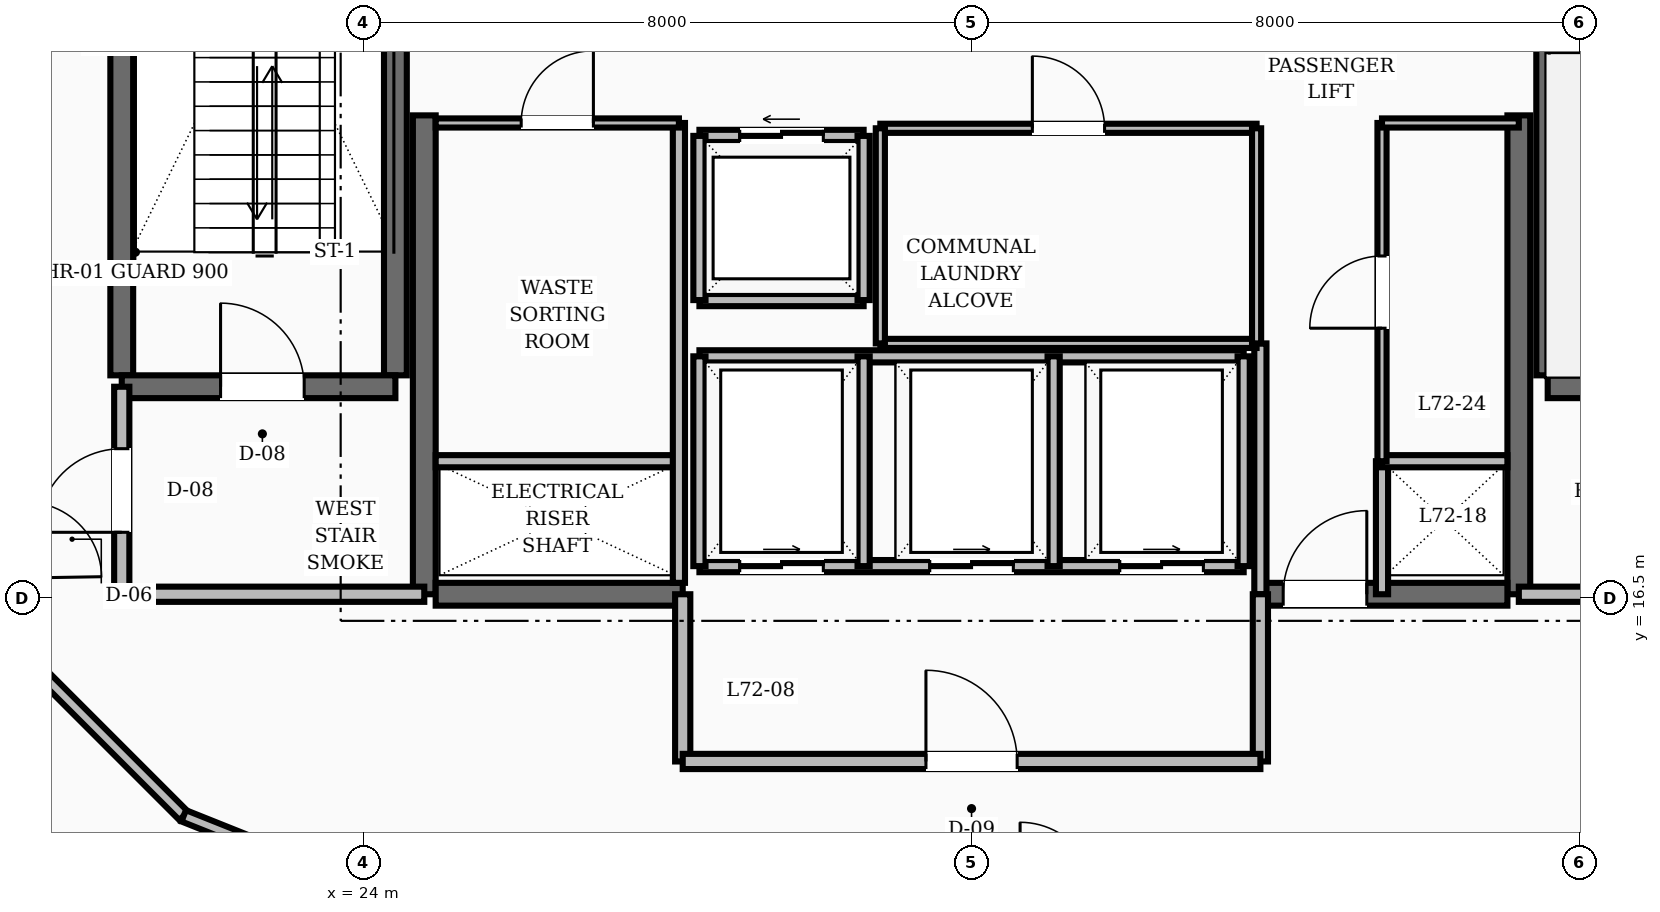
"""IFC4 building model, lengths in metres.
Left out: names, types, materials, properties, quantities, classifications, styles, units other than length and angle.
Written with IfcOpenShell. Run it as: python <this file> out.ifc"""

import sys

from ifc_helpers import new_model, si_unit, direction, frame, frame_2d, origin, place, context, subcontext, project, spatial, rectangle, extrude, element, fill, save


model = new_model("IFC4")
c1 = context("Model", 3, precision=1e-05, world=origin(), true_north=direction((0.0, 1.0)))
c2 = subcontext(c1, "Body", "Model", "MODEL_VIEW")
j1 = project(units=[si_unit("LENGTHUNIT", "METRE"), si_unit("PLANEANGLEUNIT", "RADIAN")], contexts=[c1])
p1 = place(None, origin())
s1 = spatial("IfcSite", under=j1, at=p1, CompositionType="ELEMENT")
p2 = place(p1, origin())
s2 = spatial("IfcBuilding", under=s1, at=p2, CompositionType="ELEMENT")
p3 = place(p2, frame((0.0, 0.0, 276.0)))
s3 = spatial("IfcBuildingStorey", under=s2, at=p3, CompositionType="ELEMENT", Elevation=276.0)
for number, where, z_axis, x_axis in (
    (1, (24.8, 16.55, 0.0), (0.0, 0.0, 1.0), (0.0, 1.0, 0.0)),
    (2, (39.2, 16.55, 0.0), (0.0, 0.0, 1.0), (0.0, 1.0, 0.0)),
):
    element("IfcWall", number, at=place(p3, frame(where, z_axis=z_axis, x_axis=x_axis)), inside=s3, PredefinedType="SHEAR", context=c2, shape_type="SweptSolid", body=[
        extrude(rectangle(XDim=6.3, YDim=0.3, at=frame_2d((3.15, 0.0))), origin(), (0.0, 0.0, 1.0), 3.6),
    ])
p4 = place(p3, frame((24.95, 16.55, 0.0), z_axis=(0.0, 0.0, 1.0), x_axis=(1.0, 0.0, 0.0)))
e3 = element("IfcWall", 3, at=p4, inside=s3, PredefinedType="SHEAR", context=c2, shape_type="SweptSolid", body=[
    extrude(rectangle(XDim=3.25, YDim=0.3, at=frame_2d((1.625, 0.0))), origin(), (0.0, 0.0, 1.0), 3.6),
])
p5 = place(p3, frame((35.8, 16.55, 0.0), z_axis=(0.0, 0.0, 1.0), x_axis=(1.0, 0.0, 0.0)))
e4 = element("IfcWall", 4, at=p5, inside=s3, PredefinedType="SHEAR", context=c2, shape_type="SweptSolid", body=[
    extrude(rectangle(XDim=3.25, YDim=0.3, at=frame_2d((1.625, 0.0))), origin(), (0.0, 0.0, 1.0), 3.6),
])
p6 = place(p5, frame((0.3, 0.0, 0.0)))
e5 = element("IfcOpeningElement", 5, at=p6, cuts=e4, PredefinedType="OPENING", context=c2, shape_type="SweptSolid", body=[
    extrude(rectangle(XDim=1.1, YDim=2.1, at=frame_2d((0.55, 1.05))), frame((0.0, 0.16, 0.0), z_axis=(0.0, -1.0, 0.0), x_axis=(1.0, 0.0, 0.0)), (0.0, 0.0, 1.0), 0.32),
])
for number, where, z_axis, x_axis in (
    (6, (20.82, 19.43, 0.0), (0.0, 0.0, 1.0), (0.0, 1.0, 0.0)),
    (7, (24.42, 19.43, 0.0), (0.0, 0.0, 1.0), (0.0, 1.0, 0.0)),
):
    element("IfcWall", number, at=place(p3, frame(where, z_axis=z_axis, x_axis=x_axis)), inside=s3, PredefinedType="SHEAR", context=c2, shape_type="SweptSolid", body=[
        extrude(rectangle(XDim=8.74, YDim=0.3, at=frame_2d((4.37, 0.0))), origin(), (0.0, 0.0, 1.0), 3.6),
    ])
p7 = place(p3, frame((20.82, 19.28, 0.0), z_axis=(0.0, 0.0, 1.0), x_axis=(1.0, 0.0, 0.0)))
e8 = element("IfcWall", 8, at=p7, inside=s3, PredefinedType="SHEAR", context=c2, shape_type="SweptSolid", body=[
    extrude(rectangle(XDim=3.6, YDim=0.3, at=frame_2d((1.8, 0.0))), origin(), (0.0, 0.0, 1.0), 3.6),
])
p8 = place(p7, frame((1.3, 0.0, 0.0)))
e9 = element("IfcOpeningElement", 9, at=p8, cuts=e8, PredefinedType="OPENING", context=c2, shape_type="SweptSolid", body=[
    extrude(rectangle(XDim=1.1, YDim=2.1, at=frame_2d((0.55, 1.05))), frame((0.0, 0.16, 0.0), z_axis=(0.0, -1.0, 0.0), x_axis=(1.0, 0.0, 0.0)), (0.0, 0.0, 1.0), 0.32),
])
p9 = place(p3, frame((39.58, 19.43, 0.0), z_axis=(0.0, 0.0, 1.0), x_axis=(0.0, 1.0, 0.0)))
e10 = element("IfcWall", 10, at=p9, inside=s3, PredefinedType="SHEAR", context=c2, shape_type="SweptSolid", body=[
    extrude(rectangle(XDim=8.74, YDim=0.3, at=frame_2d((4.37, 0.0))), origin(), (0.0, 0.0, 1.0), 3.6),
])
p10 = place(p3, frame((39.58, 19.28, 0.0), z_axis=(0.0, 0.0, 1.0), x_axis=(1.0, 0.0, 0.0)))
e11 = element("IfcWall", 11, at=p10, inside=s3, PredefinedType="SHEAR", context=c2, shape_type="SweptSolid", body=[
    extrude(rectangle(XDim=3.6, YDim=0.3, at=frame_2d((1.8, 0.0))), origin(), (0.0, 0.0, 1.0), 3.6),
])
p11 = place(p3, frame((20.82, 16.55, 0.0), z_axis=(0.0, 0.0, 1.0), x_axis=(0.0, 1.0, 0.0)))
e12 = element("IfcWall", 12, at=p11, inside=s3, PredefinedType="SOLIDWALL", context=c2, shape_type="SweptSolid", body=[
    extrude(rectangle(XDim=2.73, YDim=0.2, at=frame_2d((1.365, 0.0))), origin(), (0.0, 0.0, 1.0), 2.87),
])
p12 = place(p11, frame((0.815, 0.0, 0.0)))
e13 = element("IfcOpeningElement", 13, at=p12, cuts=e12, PredefinedType="OPENING", context=c2, shape_type="SweptSolid", body=[
    extrude(rectangle(XDim=1.1, YDim=2.1, at=frame_2d((0.55, 1.05))), frame((0.0, 0.11, 0.0), z_axis=(0.0, -1.0, 0.0), x_axis=(1.0, 0.0, 0.0)), (0.0, 0.0, 1.0), 0.22),
])
for number, where, z_axis, x_axis in (
    (14, (20.82, 16.55, 0.0), (0.0, 0.0, 1.0), (1.0, 0.0, 0.0)),
    (15, (39.2, 16.55, 0.0), (0.0, 0.0, 1.0), (1.0, 0.0, 0.0)),
):
    element("IfcWall", number, at=place(p3, frame(where, z_axis=z_axis, x_axis=x_axis)), inside=s3, PredefinedType="SOLIDWALL", context=c2, shape_type="SweptSolid", body=[
        extrude(rectangle(XDim=3.98, YDim=0.2, at=frame_2d((1.99, 0.0))), origin(), (0.0, 0.0, 1.0), 2.87),
    ])
p13 = place(p3, frame((35.8, 16.55, 0.0), z_axis=(0.0, 0.0, 1.0), x_axis=(0.0, 1.0, 0.0)))
e16 = element("IfcWall", 16, at=p13, inside=s3, PredefinedType="SOLIDWALL", context=c2, shape_type="SweptSolid", body=[
    extrude(rectangle(XDim=3.3, YDim=0.16, at=frame_2d((1.65, 0.0))), origin(), (0.0, 0.0, 1.0), 2.87),
])
p14 = place(p3, frame((37.4, 16.55, 0.0), z_axis=(0.0, 0.0, 1.0), x_axis=(0.0, 1.0, 0.0)))
e17 = element("IfcWall", 17, at=p14, inside=s3, PredefinedType="SOLIDWALL", context=c2, shape_type="SweptSolid", body=[
    extrude(rectangle(XDim=1.75, YDim=0.16, at=frame_2d((0.875, 0.0))), origin(), (0.0, 0.0, 1.0), 2.87),
])
for number, where, z_axis, x_axis in (
    (18, (28.2, 14.35, 0.0), (0.0, 0.0, 1.0), (0.0, 1.0, 0.0)),
    (19, (35.8, 14.35, 0.0), (0.0, 0.0, 1.0), (0.0, 1.0, 0.0)),
):
    element("IfcWall", number, at=place(p3, frame(where, z_axis=z_axis, x_axis=x_axis)), inside=s3, PredefinedType="SOLIDWALL", context=c2, shape_type="SweptSolid", body=[
        extrude(rectangle(XDim=2.2, YDim=0.2, at=frame_2d((1.1, 0.0))), origin(), (0.0, 0.0, 1.0), 2.87),
    ])
p15 = place(p3, frame((28.2, 14.35, 0.0), z_axis=(0.0, 0.0, 1.0), x_axis=(1.0, 0.0, 0.0)))
e20 = element("IfcWall", 20, at=p15, inside=s3, PredefinedType="SOLIDWALL", context=c2, shape_type="SweptSolid", body=[
    extrude(rectangle(XDim=7.6, YDim=0.2, at=frame_2d((3.8, 0.0))), origin(), (0.0, 0.0, 1.0), 2.87),
])
p16 = place(p15, frame((3.2, 0.0, 0.0)))
e21 = element("IfcOpeningElement", 21, at=p16, cuts=e20, PredefinedType="OPENING", context=c2, shape_type="SweptSolid", body=[
    extrude(rectangle(XDim=1.2, YDim=2.1, at=frame_2d((0.6, 1.05))), frame((0.0, 0.11, 0.0), z_axis=(0.0, -1.0, 0.0), x_axis=(1.0, 0.0, 0.0)), (0.0, 0.0, 1.0), 0.22),
])
p17 = place(p3, frame((28.42, 22.58, 0.0), z_axis=(0.0, 0.0, 1.0), x_axis=(1.0, 0.0, 0.0)))
e22 = element("IfcWall", 22, at=p17, inside=s3, PredefinedType="SOLIDWALL", context=c2, shape_type="SweptSolid", body=[
    extrude(rectangle(XDim=2.16, YDim=0.16, at=frame_2d((1.08, 0.0))), origin(), (0.0, 0.0, 1.0), 2.87),
])
p18 = place(p17, frame((0.53, 0.0, 0.0)))
e23 = element("IfcOpeningElement", 23, at=p18, cuts=e22, PredefinedType="OPENING", context=c2, shape_type="SweptSolid", body=[
    extrude(rectangle(XDim=1.1, YDim=2.15, at=frame_2d((0.55, 1.075))), frame((0.0, 0.09, 0.0), z_axis=(0.0, -1.0, 0.0), x_axis=(1.0, 0.0, 0.0)), (0.0, 0.0, 1.0), 0.18),
])
for number, where, z_axis, x_axis in (
    (24, (28.42, 20.42, 0.0), (0.0, 0.0, 1.0), (1.0, 0.0, 0.0)),
    (25, (28.42, 20.42, 0.0), (0.0, 0.0, 1.0), (0.0, 1.0, 0.0)),
    (26, (30.58, 20.42, 0.0), (0.0, 0.0, 1.0), (0.0, 1.0, 0.0)),
):
    element("IfcWall", number, at=place(p3, frame(where, z_axis=z_axis, x_axis=x_axis)), inside=s3, PredefinedType="SOLIDWALL", context=c2, shape_type="SweptSolid", body=[
        extrude(rectangle(XDim=2.16, YDim=0.16, at=frame_2d((1.08, 0.0))), origin(), (0.0, 0.0, 1.0), 2.87),
    ])
p19 = place(p3, frame((28.42, 16.92, 0.0), z_axis=(0.0, 0.0, 1.0), x_axis=(1.0, 0.0, 0.0)))
e27 = element("IfcWall", 27, at=p19, inside=s3, PredefinedType="SOLIDWALL", context=c2, shape_type="SweptSolid", body=[
    extrude(rectangle(XDim=7.16, YDim=0.16, at=frame_2d((3.58, 0.0))), origin(), (0.0, 0.0, 1.0), 2.87),
])
p20 = place(p19, frame((0.53, 0.0, 0.0)))
e28 = element("IfcOpeningElement", 28, at=p20, cuts=e27, PredefinedType="OPENING", context=c2, shape_type="SweptSolid", body=[
    extrude(rectangle(XDim=1.1, YDim=2.15, at=frame_2d((0.55, 1.075))), frame((0.0, 0.09, 0.0), z_axis=(0.0, -1.0, 0.0), x_axis=(1.0, 0.0, 0.0)), (0.0, 0.0, 1.0), 0.18),
])
p21 = place(p19, frame((3.03, 0.0, 0.0)))
e29 = element("IfcOpeningElement", 29, at=p21, cuts=e27, PredefinedType="OPENING", context=c2, shape_type="SweptSolid", body=[
    extrude(rectangle(XDim=1.1, YDim=2.15, at=frame_2d((0.55, 1.075))), frame((0.0, 0.09, 0.0), z_axis=(0.0, -1.0, 0.0), x_axis=(1.0, 0.0, 0.0)), (0.0, 0.0, 1.0), 0.18),
])
p22 = place(p19, frame((5.53, 0.0, 0.0)))
e30 = element("IfcOpeningElement", 30, at=p22, cuts=e27, PredefinedType="OPENING", context=c2, shape_type="SweptSolid", body=[
    extrude(rectangle(XDim=1.1, YDim=2.15, at=frame_2d((0.55, 1.075))), frame((0.0, 0.09, 0.0), z_axis=(0.0, -1.0, 0.0), x_axis=(1.0, 0.0, 0.0)), (0.0, 0.0, 1.0), 0.18),
])
p23 = place(p3, frame((28.42, 19.68, 0.0), z_axis=(0.0, 0.0, 1.0), x_axis=(1.0, 0.0, 0.0)))
e31 = element("IfcWall", 31, at=p23, inside=s3, PredefinedType="SOLIDWALL", context=c2, shape_type="SweptSolid", body=[
    extrude(rectangle(XDim=7.16, YDim=0.16, at=frame_2d((3.58, 0.0))), origin(), (0.0, 0.0, 1.0), 2.87),
])
for number, where, z_axis, x_axis in (
    (32, (28.42, 16.92, 0.0), (0.0, 0.0, 1.0), (0.0, 1.0, 0.0)),
    (33, (30.58, 16.92, 0.0), (0.0, 0.0, 1.0), (0.0, 1.0, 0.0)),
    (34, (33.08, 16.92, 0.0), (0.0, 0.0, 1.0), (0.0, 1.0, 0.0)),
    (35, (35.58, 16.92, 0.0), (0.0, 0.0, 1.0), (0.0, 1.0, 0.0)),
):
    element("IfcWall", number, at=place(p3, frame(where, z_axis=z_axis, x_axis=x_axis)), inside=s3, PredefinedType="SOLIDWALL", context=c2, shape_type="SweptSolid", body=[
        extrude(rectangle(XDim=2.76, YDim=0.16, at=frame_2d((1.38, 0.0))), origin(), (0.0, 0.0, 1.0), 2.87),
    ])
p24 = place(p3, frame((30.8, 22.68, 0.0), z_axis=(0.0, 0.0, 1.0), x_axis=(1.0, 0.0, 0.0)))
e36 = element("IfcWall", 36, at=p24, inside=s3, PredefinedType="PARTITIONING", context=c2, shape_type="SweptSolid", body=[
    extrude(rectangle(XDim=4.95, YDim=0.12, at=frame_2d((2.475, 0.0))), origin(), (0.0, 0.0, 1.0), 2.87),
])
p25 = place(p24, frame((2.0, 0.0, 0.0)))
e37 = element("IfcOpeningElement", 37, at=p25, cuts=e36, PredefinedType="OPENING", context=c2, shape_type="SweptSolid", body=[
    extrude(rectangle(XDim=0.95, YDim=2.1, at=frame_2d((0.475, 1.05))), frame((0.0, 0.07, 0.0), z_axis=(0.0, -1.0, 0.0), x_axis=(1.0, 0.0, 0.0)), (0.0, 0.0, 1.0), 0.14),
])
p26 = place(p3, frame((30.8, 19.85, 0.0), z_axis=(0.0, 0.0, 1.0), x_axis=(1.0, 0.0, 0.0)))
e38 = element("IfcWall", 38, at=p26, inside=s3, PredefinedType="PARTITIONING", context=c2, shape_type="SweptSolid", body=[
    extrude(rectangle(XDim=4.95, YDim=0.12, at=frame_2d((2.475, 0.0))), origin(), (0.0, 0.0, 1.0), 2.87),
])
for number, where, z_axis, x_axis in (
    (39, (30.8, 19.85, 0.0), (0.0, 0.0, 1.0), (0.0, 1.0, 0.0)),
    (40, (35.75, 19.85, 0.0), (0.0, 0.0, 1.0), (0.0, 1.0, 0.0)),
):
    element("IfcWall", number, at=place(p3, frame(where, z_axis=z_axis, x_axis=x_axis)), inside=s3, PredefinedType="PARTITIONING", context=c2, shape_type="SweptSolid", body=[
        extrude(rectangle(XDim=2.83, YDim=0.12, at=frame_2d((1.415, 0.0))), origin(), (0.0, 0.0, 1.0), 2.87),
    ])
p27 = place(p3, frame((24.95, 18.3, 0.0), z_axis=(0.0, 0.0, 1.0), x_axis=(1.0, 0.0, 0.0)))
e41 = element("IfcWall", 41, at=p27, inside=s3, PredefinedType="SOLIDWALL", context=c2, shape_type="SweptSolid", body=[
    extrude(rectangle(XDim=3.2, YDim=0.16, at=frame_2d((1.6, 0.0))), origin(), (0.0, 0.0, 1.0), 2.87),
])
p28 = place(p3, frame((28.15, 16.7, 0.0), z_axis=(0.0, 0.0, 1.0), x_axis=(0.0, 1.0, 0.0)))
e42 = element("IfcWall", 42, at=p28, inside=s3, PredefinedType="SOLIDWALL", context=c2, shape_type="SweptSolid", body=[
    extrude(rectangle(XDim=6.05, YDim=0.16, at=frame_2d((3.025, 0.0))), origin(), (0.0, 0.0, 1.0), 2.87),
])
p29 = place(p3, frame((37.4, 18.3, 0.0), z_axis=(0.0, 0.0, 1.0), x_axis=(1.0, 0.0, 0.0)))
e43 = element("IfcWall", 43, at=p29, inside=s3, PredefinedType="SOLIDWALL", context=c2, shape_type="SweptSolid", body=[
    extrude(rectangle(XDim=1.65, YDim=0.16, at=frame_2d((0.825, 0.0))), origin(), (0.0, 0.0, 1.0), 2.87),
])
p30 = place(p3, frame((24.95, 22.75, 0.0), z_axis=(0.0, 0.0, 1.0), x_axis=(1.0, 0.0, 0.0)))
e44 = element("IfcWall", 44, at=p30, inside=s3, PredefinedType="PARTITIONING", context=c2, shape_type="SweptSolid", body=[
    extrude(rectangle(XDim=3.2, YDim=0.12, at=frame_2d((1.6, 0.0))), origin(), (0.0, 0.0, 1.0), 2.87),
])
p31 = place(p30, frame((1.125, 0.0, 0.0)))
e45 = element("IfcOpeningElement", 45, at=p31, cuts=e44, PredefinedType="OPENING", context=c2, shape_type="SweptSolid", body=[
    extrude(rectangle(XDim=0.95, YDim=2.1, at=frame_2d((0.475, 1.05))), frame((0.0, 0.07, 0.0), z_axis=(0.0, -1.0, 0.0), x_axis=(1.0, 0.0, 0.0)), (0.0, 0.0, 1.0), 0.14),
])
p32 = place(p3, frame((37.4, 18.3, 0.0), z_axis=(0.0, 0.0, 1.0), x_axis=(0.0, 1.0, 0.0)))
e46 = element("IfcWall", 46, at=p32, inside=s3, PredefinedType="PARTITIONING", context=c2, shape_type="SweptSolid", body=[
    extrude(rectangle(XDim=4.45, YDim=0.12, at=frame_2d((2.225, 0.0))), origin(), (0.0, 0.0, 1.0), 2.87),
])
p33 = place(p32, frame((1.75, 0.0, 0.0)))
e47 = element("IfcOpeningElement", 47, at=p33, cuts=e46, PredefinedType="OPENING", context=c2, shape_type="SweptSolid", body=[
    extrude(rectangle(XDim=0.95, YDim=2.1, at=frame_2d((0.475, 1.05))), frame((0.0, 0.07, 0.0), z_axis=(0.0, -1.0, 0.0), x_axis=(1.0, 0.0, 0.0)), (0.0, 0.0, 1.0), 0.14),
])
p34 = place(p3, frame((37.4, 22.75, 0.0), z_axis=(0.0, 0.0, 1.0), x_axis=(1.0, 0.0, 0.0)))
e48 = element("IfcWall", 48, at=p34, inside=s3, PredefinedType="PARTITIONING", context=c2, shape_type="SweptSolid", body=[
    extrude(rectangle(XDim=1.8, YDim=0.12, at=frame_2d((0.9, 0.0))), origin(), (0.0, 0.0, 1.0), 2.87),
])
p35 = place(p3, frame((19.573, 15.697, 0.0), z_axis=(0.0, 0.0, 1.0), x_axis=(0.707106781187, -0.707106781187, 0.0)))
e49 = element("IfcWall", 49, at=p35, inside=s3, PredefinedType="SOLIDWALL", context=c2, shape_type="SweptSolid", body=[
    extrude(rectangle(XDim=2.916, YDim=0.16, at=frame_2d((1.458, 0.0))), origin(), (0.0, 0.0, 1.0), 2.87),
])
p36 = place(p3, frame((21.635, 13.635, 0.0), z_axis=(0.0, 0.0, 1.0), x_axis=(0.92856882165, -0.371160266542, 0.0)))
e50 = element("IfcWall", 50, at=p36, inside=s3, PredefinedType="SOLIDWALL", context=c2, shape_type="SweptSolid", body=[
    extrude(rectangle(XDim=2.923, YDim=0.16, at=frame_2d((1.461, 0.0))), origin(), (0.0, 0.0, 1.0), 2.87),
])
p37 = place(p3, frame((39.651, 12.55, 0.0), z_axis=(0.0, 0.0, 1.0), x_axis=(0.92856882165, 0.371160266542, 0.0)))
e51 = element("IfcWall", 51, at=p37, inside=s3, PredefinedType="SOLIDWALL", context=c2, shape_type="SweptSolid", body=[
    extrude(rectangle(XDim=2.923, YDim=0.16, at=frame_2d((1.461, 0.0))), origin(), (0.0, 0.0, 1.0), 2.87),
])
p38 = place(p37, frame((0.987, 0.0, 0.0)))
e52 = element("IfcOpeningElement", 52, at=p38, cuts=e51, PredefinedType="OPENING", context=c2, shape_type="SweptSolid", body=[
    extrude(rectangle(XDim=0.95, YDim=2.1, at=frame_2d((0.475, 1.05))), frame((0.0, 0.09, 0.0), z_axis=(0.0, -1.0, 0.0), x_axis=(1.0, 0.0, 0.0)), (0.0, 0.0, 1.0), 0.18),
])
p39 = place(p3, frame((17.688, 13.809, 0.0), z_axis=(0.0, 0.0, 1.0), x_axis=(0.736103094718, -0.67686943641, 0.0)))
e53 = element("IfcWall", 53, at=p39, inside=s3, PredefinedType="PARTITIONING", context=c2, shape_type="SweptSolid", body=[
    extrude(rectangle(XDim=6.842, YDim=0.12, at=frame_2d((3.421, 0.0))), origin(), (0.0, 0.0, 1.0), 2.87),
])
p40 = place(p39, frame((2.946, 0.0, 0.0)))
e54 = element("IfcOpeningElement", 54, at=p40, cuts=e53, PredefinedType="OPENING", context=c2, shape_type="SweptSolid", body=[
    extrude(rectangle(XDim=0.95, YDim=2.1, at=frame_2d((0.475, 1.05))), frame((0.0, 0.07, 0.0), z_axis=(0.0, -1.0, 0.0), x_axis=(1.0, 0.0, 0.0)), (0.0, 0.0, 1.0), 0.14),
])
p41 = place(p8, origin())
e55 = element("IfcDoor", 55, at=p41, inside=s3, OperationType="SINGLE_SWING_LEFT", PredefinedType="DOOR", context=c2, shape_type="SweptSolid", body=[
    extrude(rectangle(XDim=1.1, YDim=2.1, at=frame_2d((0.55, 1.05))), frame((0.0, 0.025, 0.0), z_axis=(0.0, -1.0, 0.0), x_axis=(1.0, 0.0, 0.0)), (0.0, 0.0, 1.0), 0.05),
])
fill(e9, e55)
p42 = place(p12, origin())
e56 = element("IfcDoor", 56, at=p42, inside=s3, OperationType="SINGLE_SWING_LEFT", PredefinedType="DOOR", context=c2, shape_type="SweptSolid", body=[
    extrude(rectangle(XDim=1.1, YDim=2.1, at=frame_2d((0.55, 1.05))), frame((0.0, 0.025, 0.0), z_axis=(0.0, -1.0, 0.0), x_axis=(1.0, 0.0, 0.0)), (0.0, 0.0, 1.0), 0.05),
])
fill(e13, e56)
p43 = place(p6, origin())
e57 = element("IfcDoor", 57, at=p43, inside=s3, OperationType="SINGLE_SWING_RIGHT", PredefinedType="DOOR", context=c2, shape_type="SweptSolid", body=[
    extrude(rectangle(XDim=1.1, YDim=2.1, at=frame_2d((0.55, 1.05))), frame((0.0, 0.025, 0.0), z_axis=(0.0, -1.0, 0.0), x_axis=(1.0, 0.0, 0.0)), (0.0, 0.0, 1.0), 0.05),
])
fill(e5, e57)
p44 = place(p16, origin())
e58 = element("IfcDoor", 58, at=p44, inside=s3, OperationType="SINGLE_SWING_LEFT", PredefinedType="DOOR", context=c2, shape_type="SweptSolid", body=[
    extrude(rectangle(XDim=1.2, YDim=2.1, at=frame_2d((0.6, 1.05))), frame((0.0, 0.025, 0.0), z_axis=(0.0, -1.0, 0.0), x_axis=(1.0, 0.0, 0.0)), (0.0, 0.0, 1.0), 0.05),
])
fill(e21, e58)
p45 = place(p18, origin())
e59 = element("IfcDoor", 59, at=p45, inside=s3, OperationType="SLIDING_TO_LEFT", PredefinedType="DOOR", context=c2, shape_type="SweptSolid", body=[
    extrude(rectangle(XDim=1.1, YDim=2.15, at=frame_2d((0.55, 1.075))), frame((0.0, 0.025, 0.0), z_axis=(0.0, -1.0, 0.0), x_axis=(1.0, 0.0, 0.0)), (0.0, 0.0, 1.0), 0.05),
])
fill(e23, e59)
p46 = place(p20, origin())
e60 = element("IfcDoor", 60, at=p46, inside=s3, OperationType="SLIDING_TO_RIGHT", PredefinedType="DOOR", context=c2, shape_type="SweptSolid", body=[
    extrude(rectangle(XDim=1.1, YDim=2.15, at=frame_2d((0.55, 1.075))), frame((0.0, 0.025, 0.0), z_axis=(0.0, -1.0, 0.0), x_axis=(1.0, 0.0, 0.0)), (0.0, 0.0, 1.0), 0.05),
])
fill(e28, e60)
p47 = place(p21, origin())
e61 = element("IfcDoor", 61, at=p47, inside=s3, OperationType="SLIDING_TO_RIGHT", PredefinedType="DOOR", context=c2, shape_type="SweptSolid", body=[
    extrude(rectangle(XDim=1.1, YDim=2.15, at=frame_2d((0.55, 1.075))), frame((0.0, 0.025, 0.0), z_axis=(0.0, -1.0, 0.0), x_axis=(1.0, 0.0, 0.0)), (0.0, 0.0, 1.0), 0.05),
])
fill(e29, e61)
p48 = place(p22, origin())
e62 = element("IfcDoor", 62, at=p48, inside=s3, OperationType="SLIDING_TO_RIGHT", PredefinedType="DOOR", context=c2, shape_type="SweptSolid", body=[
    extrude(rectangle(XDim=1.1, YDim=2.15, at=frame_2d((0.55, 1.075))), frame((0.0, 0.025, 0.0), z_axis=(0.0, -1.0, 0.0), x_axis=(1.0, 0.0, 0.0)), (0.0, 0.0, 1.0), 0.05),
])
fill(e30, e62)
p49 = place(p25, origin())
e63 = element("IfcDoor", 63, at=p49, inside=s3, OperationType="SINGLE_SWING_LEFT", PredefinedType="DOOR", context=c2, shape_type="SweptSolid", body=[
    extrude(rectangle(XDim=0.95, YDim=2.1, at=frame_2d((0.475, 1.05))), frame((0.0, 0.025, 0.0), z_axis=(0.0, -1.0, 0.0), x_axis=(1.0, 0.0, 0.0)), (0.0, 0.0, 1.0), 0.05),
])
fill(e37, e63)
p50 = place(p31, origin())
e64 = element("IfcDoor", 64, at=p50, inside=s3, OperationType="SINGLE_SWING_RIGHT", PredefinedType="DOOR", context=c2, shape_type="SweptSolid", body=[
    extrude(rectangle(XDim=0.95, YDim=2.1, at=frame_2d((0.475, 1.05))), frame((0.0, 0.025, 0.0), z_axis=(0.0, -1.0, 0.0), x_axis=(1.0, 0.0, 0.0)), (0.0, 0.0, 1.0), 0.05),
])
fill(e45, e64)
p51 = place(p33, origin())
e65 = element("IfcDoor", 65, at=p51, inside=s3, OperationType="SINGLE_SWING_LEFT", PredefinedType="DOOR", context=c2, shape_type="SweptSolid", body=[
    extrude(rectangle(XDim=0.95, YDim=2.1, at=frame_2d((0.475, 1.05))), frame((0.0, 0.025, 0.0), z_axis=(0.0, -1.0, 0.0), x_axis=(1.0, 0.0, 0.0)), (0.0, 0.0, 1.0), 0.05),
])
fill(e47, e65)
save(model, sys.argv[1])
